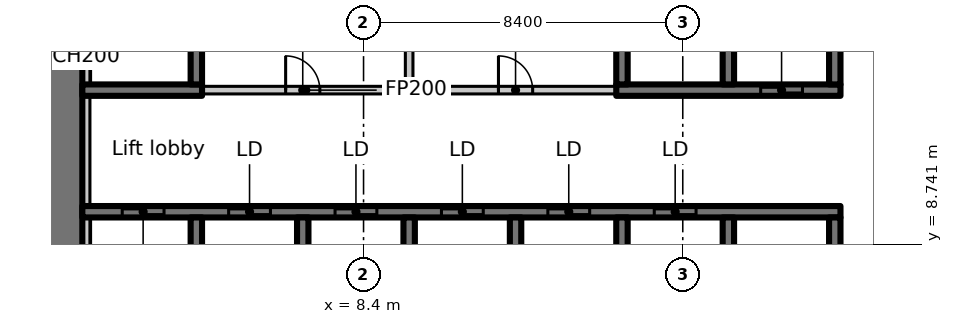
"""IFC4 building model, lengths in metres.
Left out: names, types, materials, properties, quantities, classifications, styles, units other than length and angle.
Written with IfcOpenShell. Run it as: python <this file> out.ifc"""

import sys

from ifc_helpers import new_model, si_unit, direction, frame, frame_2d, origin, place, context, subcontext, project, spatial, rectangle, extrude, element, fill, save


model = new_model("IFC4")
c1 = context("Model", 3, precision=1e-05, world=origin(), true_north=direction((0.0, 1.0)))
c2 = subcontext(c1, "Body", "Model", "MODEL_VIEW")
j1 = project(units=[si_unit("LENGTHUNIT", "METRE"), si_unit("PLANEANGLEUNIT", "RADIAN")], contexts=[c1])
p1 = place(None, origin())
s1 = spatial("IfcSite", under=j1, at=p1, CompositionType="ELEMENT")
p2 = place(p1, origin())
s2 = spatial("IfcBuilding", under=s1, at=p2, CompositionType="ELEMENT")
p3 = place(p2, frame((0.0, 0.0, 43.7)))
s3 = spatial("IfcBuildingStorey", under=s2, at=p3, CompositionType="ELEMENT", Elevation=43.7)
p4 = place(p3, frame((0.5, 6.936, 0.0), z_axis=(0.0, 0.0, 1.0), x_axis=(0.0, 1.0, 0.0)))
e1 = element("IfcWall", 1, at=p4, inside=s3, PredefinedType="SHEAR", context=c2, shape_type="SweptSolid", body=[
    extrude(rectangle(XDim=8.864, YDim=1.0, at=frame_2d((4.432, 0.0))), origin(), (0.0, 0.0, 1.0), 3.35),
])
p5 = place(p3, frame((1.0, 9.6, 0.0), z_axis=(0.0, 0.0, 1.0), x_axis=(1.0, 0.0, 0.0)))
e2 = element("IfcWall", 2, at=p5, inside=s3, PredefinedType="SHEAR", context=c2, shape_type="SweptSolid", body=[
    extrude(rectangle(XDim=19.95, YDim=0.3, at=frame_2d((9.975, 0.0))), origin(), (0.0, 0.0, 1.0), 3.35),
])
p6 = place(p5, frame((1.05, 0.0, 0.0)))
e3 = element("IfcOpeningElement", 3, at=p6, cuts=e2, PredefinedType="OPENING", context=c2, shape_type="SweptSolid", body=[
    extrude(rectangle(XDim=1.1, YDim=2.3, at=frame_2d((0.55, 1.15))), frame((0.0, 0.16, 0.0), z_axis=(0.0, -1.0, 0.0), x_axis=(1.0, 0.0, 0.0)), (0.0, 0.0, 1.0), 0.32),
])
p7 = place(p5, frame((3.85, 0.0, 0.0)))
e4 = element("IfcOpeningElement", 4, at=p7, cuts=e2, PredefinedType="OPENING", context=c2, shape_type="SweptSolid", body=[
    extrude(rectangle(XDim=1.1, YDim=2.3, at=frame_2d((0.55, 1.15))), frame((0.0, 0.16, 0.0), z_axis=(0.0, -1.0, 0.0), x_axis=(1.0, 0.0, 0.0)), (0.0, 0.0, 1.0), 0.32),
])
p8 = place(p5, frame((6.65, 0.0, 0.0)))
e5 = element("IfcOpeningElement", 5, at=p8, cuts=e2, PredefinedType="OPENING", context=c2, shape_type="SweptSolid", body=[
    extrude(rectangle(XDim=1.1, YDim=2.3, at=frame_2d((0.55, 1.15))), frame((0.0, 0.16, 0.0), z_axis=(0.0, -1.0, 0.0), x_axis=(1.0, 0.0, 0.0)), (0.0, 0.0, 1.0), 0.32),
])
p9 = place(p5, frame((9.45, 0.0, 0.0)))
e6 = element("IfcOpeningElement", 6, at=p9, cuts=e2, PredefinedType="OPENING", context=c2, shape_type="SweptSolid", body=[
    extrude(rectangle(XDim=1.1, YDim=2.3, at=frame_2d((0.55, 1.15))), frame((0.0, 0.16, 0.0), z_axis=(0.0, -1.0, 0.0), x_axis=(1.0, 0.0, 0.0)), (0.0, 0.0, 1.0), 0.32),
])
p10 = place(p5, frame((12.25, 0.0, 0.0)))
e7 = element("IfcOpeningElement", 7, at=p10, cuts=e2, PredefinedType="OPENING", context=c2, shape_type="SweptSolid", body=[
    extrude(rectangle(XDim=1.1, YDim=2.3, at=frame_2d((0.55, 1.15))), frame((0.0, 0.16, 0.0), z_axis=(0.0, -1.0, 0.0), x_axis=(1.0, 0.0, 0.0)), (0.0, 0.0, 1.0), 0.32),
])
p11 = place(p5, frame((15.05, 0.0, 0.0)))
e8 = element("IfcOpeningElement", 8, at=p11, cuts=e2, PredefinedType="OPENING", context=c2, shape_type="SweptSolid", body=[
    extrude(rectangle(XDim=1.1, YDim=2.3, at=frame_2d((0.55, 1.15))), frame((0.0, 0.16, 0.0), z_axis=(0.0, -1.0, 0.0), x_axis=(1.0, 0.0, 0.0)), (0.0, 0.0, 1.0), 0.32),
])
for number, where, z_axis, x_axis in (
    (9, (4.0, 7.15, 0.0), (0.0, 0.0, 1.0), (0.0, 1.0, 0.0)),
    (10, (6.8, 7.15, 0.0), (0.0, 0.0, 1.0), (0.0, 1.0, 0.0)),
    (11, (9.6, 7.15, 0.0), (0.0, 0.0, 1.0), (0.0, 1.0, 0.0)),
    (12, (12.4, 7.15, 0.0), (0.0, 0.0, 1.0), (0.0, 1.0, 0.0)),
    (13, (15.2, 7.15, 0.0), (0.0, 0.0, 1.0), (0.0, 1.0, 0.0)),
    (14, (18.0, 7.15, 0.0), (0.0, 0.0, 1.0), (0.0, 1.0, 0.0)),
    (15, (20.8, 7.15, 0.0), (0.0, 0.0, 1.0), (0.0, 1.0, 0.0)),
):
    element("IfcWall", number, at=place(p3, frame(where, z_axis=z_axis, x_axis=x_axis)), inside=s3, PredefinedType="SHEAR", context=c2, shape_type="SweptSolid", body=[
        extrude(rectangle(XDim=2.3, YDim=0.3, at=frame_2d((1.15, 0.0))), origin(), (0.0, 0.0, 1.0), 3.35),
    ])
p12 = place(p3, frame((1.0, 12.8, 0.0), z_axis=(0.0, 0.0, 1.0), x_axis=(1.0, 0.0, 0.0)))
e16 = element("IfcWall", 16, at=p12, inside=s3, PredefinedType="SHEAR", context=c2, shape_type="SweptSolid", body=[
    extrude(rectangle(XDim=3.15, YDim=0.3, at=frame_2d((1.575, 0.0))), origin(), (0.0, 0.0, 1.0), 3.35),
])
p13 = place(p3, frame((4.0, 12.95, 0.0), z_axis=(0.0, 0.0, 1.0), x_axis=(0.0, 1.0, 0.0)))
e17 = element("IfcWall", 17, at=p13, inside=s3, PredefinedType="SHEAR", context=c2, shape_type="SweptSolid", body=[
    extrude(rectangle(XDim=2.85, YDim=0.3, at=frame_2d((1.425, 0.0))), origin(), (0.0, 0.0, 1.0), 3.35),
])
p14 = place(p3, frame((15.05, 12.8, 0.0), z_axis=(0.0, 0.0, 1.0), x_axis=(1.0, 0.0, 0.0)))
e18 = element("IfcWall", 18, at=p14, inside=s3, PredefinedType="SHEAR", context=c2, shape_type="SweptSolid", body=[
    extrude(rectangle(XDim=5.9, YDim=0.3, at=frame_2d((2.95, 0.0))), origin(), (0.0, 0.0, 1.0), 3.35),
])
p15 = place(p14, frame((3.8, 0.0, 0.0)))
e19 = element("IfcOpeningElement", 19, at=p15, cuts=e18, PredefinedType="OPENING", context=c2, shape_type="SweptSolid", body=[
    extrude(rectangle(XDim=1.1, YDim=2.3, at=frame_2d((0.55, 1.15))), frame((0.0, 0.16, 0.0), z_axis=(0.0, -1.0, 0.0), x_axis=(1.0, 0.0, 0.0)), (0.0, 0.0, 1.0), 0.32),
])
for number, where, z_axis, x_axis in (
    (20, (15.2, 12.95, 0.0), (0.0, 0.0, 1.0), (0.0, 1.0, 0.0)),
    (21, (18.0, 12.95, 0.0), (0.0, 0.0, 1.0), (0.0, 1.0, 0.0)),
    (22, (20.8, 12.95, 0.0), (0.0, 0.0, 1.0), (0.0, 1.0, 0.0)),
):
    element("IfcWall", number, at=place(p3, frame(where, z_axis=z_axis, x_axis=x_axis)), inside=s3, PredefinedType="SHEAR", context=c2, shape_type="SweptSolid", body=[
        extrude(rectangle(XDim=2.85, YDim=0.3, at=frame_2d((1.425, 0.0))), origin(), (0.0, 0.0, 1.0), 3.35),
    ])
p16 = place(p3, frame((4.162, 12.8, 0.0), z_axis=(0.0, 0.0, 1.0), x_axis=(1.0, 0.0, 0.0)))
e23 = element("IfcWall", 23, at=p16, inside=s3, PredefinedType="PARTITIONING", context=c2, shape_type="SweptSolid", body=[
    extrude(rectangle(XDim=5.438, YDim=0.2, at=frame_2d((2.719, 0.0))), origin(), (0.0, 0.0, 1.0), 3.35),
])
p17 = place(p16, frame((2.188, 0.0, 0.0)))
e24 = element("IfcOpeningElement", 24, at=p17, cuts=e23, PredefinedType="OPENING", context=c2, shape_type="SweptSolid", body=[
    extrude(rectangle(XDim=0.9, YDim=2.1, at=frame_2d((0.45, 1.05))), frame((0.0, 0.11, 0.0), z_axis=(0.0, -1.0, 0.0), x_axis=(1.0, 0.0, 0.0)), (0.0, 0.0, 1.0), 0.22),
])
p18 = place(p3, frame((9.6, 12.8, 0.0), z_axis=(0.0, 0.0, 1.0), x_axis=(1.0, 0.0, 0.0)))
e25 = element("IfcWall", 25, at=p18, inside=s3, PredefinedType="PARTITIONING", context=c2, shape_type="SweptSolid", body=[
    extrude(rectangle(XDim=5.438, YDim=0.2, at=frame_2d((2.719, 0.0))), origin(), (0.0, 0.0, 1.0), 3.35),
])
p19 = place(p18, frame((2.35, 0.0, 0.0)))
e26 = element("IfcOpeningElement", 26, at=p19, cuts=e25, PredefinedType="OPENING", context=c2, shape_type="SweptSolid", body=[
    extrude(rectangle(XDim=0.9, YDim=2.1, at=frame_2d((0.45, 1.05))), frame((0.0, 0.11, 0.0), z_axis=(0.0, -1.0, 0.0), x_axis=(1.0, 0.0, 0.0)), (0.0, 0.0, 1.0), 0.22),
])
p20 = place(p3, frame((9.6, 15.588, 0.0), z_axis=(0.0, 0.0, 1.0), x_axis=(0.0, -1.0, 0.0)))
e27 = element("IfcWall", 27, at=p20, inside=s3, PredefinedType="PARTITIONING", context=c2, shape_type="SweptSolid", body=[
    extrude(rectangle(XDim=2.688, YDim=0.2, at=frame_2d((1.344, 0.0))), origin(), (0.0, 0.0, 1.0), 3.35),
])
p21 = place(p3, frame((1.1, 7.15, 0.0), z_axis=(0.0, 0.0, 1.0), x_axis=(0.0, 1.0, 0.0)))
e28 = element("IfcWall", 28, at=p21, inside=s3, PredefinedType="PARTITIONING", context=c2, shape_type="SweptSolid", body=[
    extrude(rectangle(XDim=2.3, YDim=0.2, at=frame_2d((1.15, 0.0))), origin(), (0.0, 0.0, 1.0), 3.35),
])
p22 = place(p3, frame((1.1, 9.75, 0.0), z_axis=(0.0, 0.0, 1.0), x_axis=(0.0, 1.0, 0.0)))
e29 = element("IfcWall", 29, at=p22, inside=s3, PredefinedType="PARTITIONING", context=c2, shape_type="SweptSolid", body=[
    extrude(rectangle(XDim=2.9, YDim=0.2, at=frame_2d((1.45, 0.0))), origin(), (0.0, 0.0, 1.0), 3.35),
])
p23 = place(p3, frame((1.1, 12.95, 0.0), z_axis=(0.0, 0.0, 1.0), x_axis=(0.0, 1.0, 0.0)))
e30 = element("IfcWall", 30, at=p23, inside=s3, PredefinedType="PARTITIONING", context=c2, shape_type="SweptSolid", body=[
    extrude(rectangle(XDim=2.65, YDim=0.2, at=frame_2d((1.325, 0.0))), origin(), (0.0, 0.0, 1.0), 3.35),
])
p24 = place(p6, origin())
e31 = element("IfcDoor", 31, at=p24, inside=s3, OperationType="SLIDING_TO_LEFT", PredefinedType="DOOR", context=c2, shape_type="SweptSolid", body=[
    extrude(rectangle(XDim=1.1, YDim=2.3, at=frame_2d((0.55, 1.15))), frame((0.0, 0.025, 0.0), z_axis=(0.0, -1.0, 0.0), x_axis=(1.0, 0.0, 0.0)), (0.0, 0.0, 1.0), 0.05),
])
fill(e3, e31)
p25 = place(p7, origin())
e32 = element("IfcDoor", 32, at=p25, inside=s3, OperationType="SLIDING_TO_LEFT", PredefinedType="DOOR", context=c2, shape_type="SweptSolid", body=[
    extrude(rectangle(XDim=1.1, YDim=2.3, at=frame_2d((0.55, 1.15))), frame((0.0, 0.025, 0.0), z_axis=(0.0, -1.0, 0.0), x_axis=(1.0, 0.0, 0.0)), (0.0, 0.0, 1.0), 0.05),
])
fill(e4, e32)
p26 = place(p8, origin())
e33 = element("IfcDoor", 33, at=p26, inside=s3, OperationType="SLIDING_TO_LEFT", PredefinedType="DOOR", context=c2, shape_type="SweptSolid", body=[
    extrude(rectangle(XDim=1.1, YDim=2.3, at=frame_2d((0.55, 1.15))), frame((0.0, 0.025, 0.0), z_axis=(0.0, -1.0, 0.0), x_axis=(1.0, 0.0, 0.0)), (0.0, 0.0, 1.0), 0.05),
])
fill(e5, e33)
p27 = place(p9, origin())
e34 = element("IfcDoor", 34, at=p27, inside=s3, OperationType="SLIDING_TO_LEFT", PredefinedType="DOOR", context=c2, shape_type="SweptSolid", body=[
    extrude(rectangle(XDim=1.1, YDim=2.3, at=frame_2d((0.55, 1.15))), frame((0.0, 0.025, 0.0), z_axis=(0.0, -1.0, 0.0), x_axis=(1.0, 0.0, 0.0)), (0.0, 0.0, 1.0), 0.05),
])
fill(e6, e34)
p28 = place(p10, origin())
e35 = element("IfcDoor", 35, at=p28, inside=s3, OperationType="SLIDING_TO_LEFT", PredefinedType="DOOR", context=c2, shape_type="SweptSolid", body=[
    extrude(rectangle(XDim=1.1, YDim=2.3, at=frame_2d((0.55, 1.15))), frame((0.0, 0.025, 0.0), z_axis=(0.0, -1.0, 0.0), x_axis=(1.0, 0.0, 0.0)), (0.0, 0.0, 1.0), 0.05),
])
fill(e7, e35)
p29 = place(p11, origin())
e36 = element("IfcDoor", 36, at=p29, inside=s3, OperationType="SLIDING_TO_LEFT", PredefinedType="DOOR", context=c2, shape_type="SweptSolid", body=[
    extrude(rectangle(XDim=1.1, YDim=2.3, at=frame_2d((0.55, 1.15))), frame((0.0, 0.025, 0.0), z_axis=(0.0, -1.0, 0.0), x_axis=(1.0, 0.0, 0.0)), (0.0, 0.0, 1.0), 0.05),
])
fill(e8, e36)
p30 = place(p15, origin())
e37 = element("IfcDoor", 37, at=p30, inside=s3, OperationType="SLIDING_TO_LEFT", PredefinedType="DOOR", context=c2, shape_type="SweptSolid", body=[
    extrude(rectangle(XDim=1.1, YDim=2.3, at=frame_2d((0.55, 1.15))), frame((0.0, 0.025, 0.0), z_axis=(0.0, -1.0, 0.0), x_axis=(1.0, 0.0, 0.0)), (0.0, 0.0, 1.0), 0.05),
])
fill(e19, e37)
p31 = place(p17, origin())
e38 = element("IfcDoor", 38, at=p31, inside=s3, OperationType="SINGLE_SWING_LEFT", PredefinedType="DOOR", context=c2, shape_type="SweptSolid", body=[
    extrude(rectangle(XDim=0.9, YDim=2.1, at=frame_2d((0.45, 1.05))), frame((0.0, 0.025, 0.0), z_axis=(0.0, -1.0, 0.0), x_axis=(1.0, 0.0, 0.0)), (0.0, 0.0, 1.0), 0.05),
])
fill(e24, e38)
p32 = place(p19, origin())
e39 = element("IfcDoor", 39, at=p32, inside=s3, OperationType="SINGLE_SWING_RIGHT", PredefinedType="DOOR", context=c2, shape_type="SweptSolid", body=[
    extrude(rectangle(XDim=0.9, YDim=2.1, at=frame_2d((0.45, 1.05))), frame((0.0, 0.025, 0.0), z_axis=(0.0, -1.0, 0.0), x_axis=(1.0, 0.0, 0.0)), (0.0, 0.0, 1.0), 0.05),
])
fill(e26, e39)
save(model, sys.argv[1])
